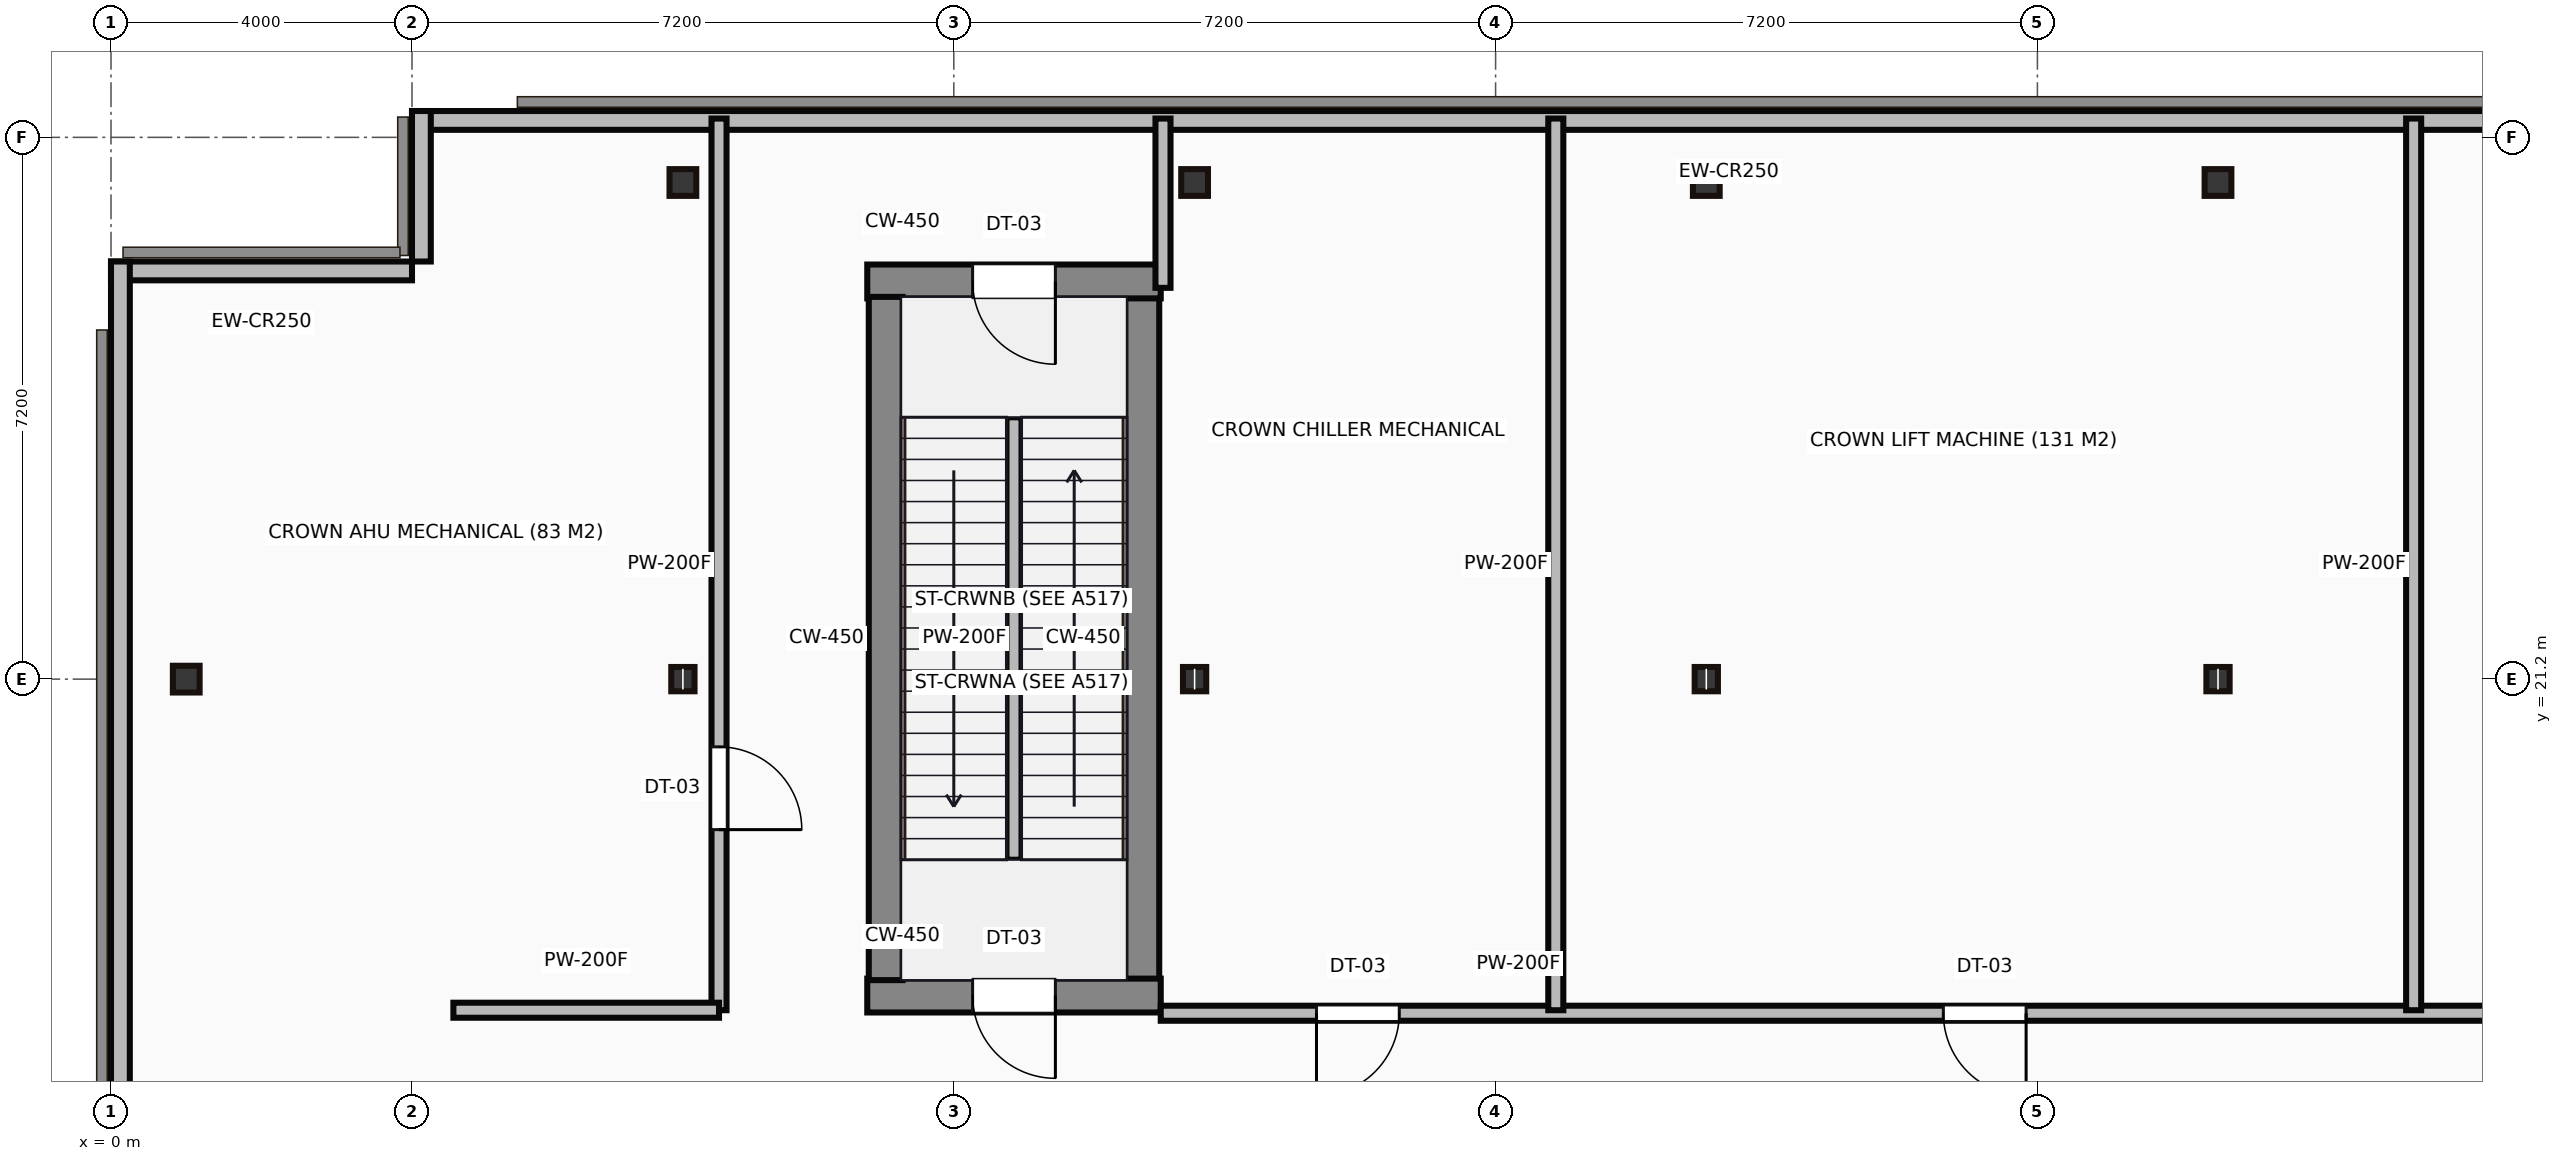
"""IFC4 building model, lengths in metres.
Left out: names, types, materials, properties, quantities, classifications, styles, units other than length and angle.
Written with IfcOpenShell. Run it as: python <this file> out.ifc"""

import sys

from ifc_helpers import new_model, si_unit, direction, frame, frame_2d, origin, origin_2d, place, context, subcontext, project, spatial, rectangle, hollow_rectangle, i_section, extrude, source, transform, mapped, element, fill, save


model = new_model("IFC4")
c1 = context("Model", 3, precision=1e-05, world=origin(), true_north=direction((0.0, 1.0)))
c2 = subcontext(c1, "Body", "Model", "MODEL_VIEW")
j1 = project(units=[si_unit("LENGTHUNIT", "METRE"), si_unit("PLANEANGLEUNIT", "RADIAN")], contexts=[c1])
p1 = place(None, origin())
s1 = spatial("IfcSite", under=j1, at=p1, CompositionType="ELEMENT")
p2 = place(p1, origin())
s2 = spatial("IfcBuilding", under=s1, at=p2, CompositionType="ELEMENT")
p3 = place(p2, frame((0.0, 0.0, 303.65)))
s3 = spatial("IfcBuildingStorey", under=s2, at=p3, CompositionType="ELEMENT", Elevation=303.65)
m1 = source(origin(), c2, "Body", "SweptSolid", [
    extrude(hollow_rectangle(XDim=0.356, YDim=0.356, WallThickness=0.019, at=origin_2d()), origin(), (0.0, 0.0, 1.0), 3.8),
])
p4 = place(p3, frame((1.0, 21.2, 0.0), z_axis=(0.0, 0.0, 1.0), x_axis=(1.0, 0.0, 0.0)))
e1 = element("IfcColumn", 1, at=p4, inside=s3, PredefinedType="COLUMN", context=c2, shape_type="MappedRepresentation", body=[
    mapped(m1, transform((0.0, 0.0, 0.0))),
])
m2 = source(origin(), c2, "Body", "SweptSolid", [
    extrude(i_section(OverallWidth=0.309, OverallDepth=0.323, WebThickness=0.014, FlangeThickness=0.023, at=origin_2d()), origin(), (0.0, 0.0, 1.0), 3.8),
])
p5 = place(p3, frame((7.6, 21.2, 0.0), z_axis=(0.0, 0.0, 1.0), x_axis=(1.0, 0.0, 0.0)))
e2 = element("IfcColumn", 2, at=p5, inside=s3, PredefinedType="COLUMN", context=c2, shape_type="MappedRepresentation", body=[
    mapped(m2, transform((0.0, 0.0, 0.0))),
])
p6 = place(p3, frame((7.6, 27.8, 0.0), z_axis=(0.0, 0.0, 1.0), x_axis=(1.0, 0.0, 0.0)))
e3 = element("IfcColumn", 3, at=p6, inside=s3, PredefinedType="COLUMN", context=c2, shape_type="MappedRepresentation", body=[
    mapped(m1, transform((0.0, 0.0, 0.0))),
])
p7 = place(p3, frame((14.4, 21.2, 0.0), z_axis=(0.0, 0.0, 1.0), x_axis=(1.0, 0.0, 0.0)))
e4 = element("IfcColumn", 4, at=p7, inside=s3, PredefinedType="COLUMN", context=c2, shape_type="MappedRepresentation", body=[
    mapped(m2, transform((0.0, 0.0, 0.0))),
])
p8 = place(p3, frame((14.4, 27.8, 0.0), z_axis=(0.0, 0.0, 1.0), x_axis=(1.0, 0.0, 0.0)))
e5 = element("IfcColumn", 5, at=p8, inside=s3, PredefinedType="COLUMN", context=c2, shape_type="MappedRepresentation", body=[
    mapped(m1, transform((0.0, 0.0, 0.0))),
])
p9 = place(p3, frame((21.2, 21.2, 0.0), z_axis=(0.0, 0.0, 1.0), x_axis=(1.0, 0.0, 0.0)))
e6 = element("IfcColumn", 6, at=p9, inside=s3, PredefinedType="COLUMN", context=c2, shape_type="MappedRepresentation", body=[
    mapped(m2, transform((0.0, 0.0, 0.0))),
])
p10 = place(p3, frame((21.2, 27.8, 0.0), z_axis=(0.0, 0.0, 1.0), x_axis=(1.0, 0.0, 0.0)))
e7 = element("IfcColumn", 7, at=p10, inside=s3, PredefinedType="COLUMN", context=c2, shape_type="MappedRepresentation", body=[
    mapped(m1, transform((0.0, 0.0, 0.0))),
])
p11 = place(p3, frame((28.0, 21.2, 0.0), z_axis=(0.0, 0.0, 1.0), x_axis=(1.0, 0.0, 0.0)))
e8 = element("IfcColumn", 8, at=p11, inside=s3, PredefinedType="COLUMN", context=c2, shape_type="MappedRepresentation", body=[
    mapped(m2, transform((0.0, 0.0, 0.0))),
])
p12 = place(p3, frame((28.0, 27.8, 0.0), z_axis=(0.0, 0.0, 1.0), x_axis=(1.0, 0.0, 0.0)))
e9 = element("IfcColumn", 9, at=p12, inside=s3, PredefinedType="COLUMN", context=c2, shape_type="MappedRepresentation", body=[
    mapped(m1, transform((0.0, 0.0, 0.0))),
])
m3 = source(origin(), c2, "Body", "SweptSolid", [
    extrude(rectangle(XDim=35.0, YDim=0.25, at=frame_2d((17.5, 0.0))), origin(), (0.0, 0.0, 1.0), 3.5),
])
p13 = place(p3, frame((39.0, 28.625, 0.0), z_axis=(0.0, 0.0, 1.0), x_axis=(-1.0, 0.0, 0.0)))
e10 = element("IfcWall", 10, at=p13, inside=s3, PredefinedType="STANDARD", context=c2, shape_type="MappedRepresentation", body=[
    mapped(m3, transform((0.0, 0.0, 0.0))),
])
m4 = source(origin(), c2, "Body", "SweptSolid", [
    extrude(rectangle(XDim=2.0, YDim=0.25, at=frame_2d((1.0, 0.0))), origin(), (0.0, 0.0, 1.0), 3.5),
])
p14 = place(p3, frame((4.125, 28.75, 0.0), z_axis=(0.0, 0.0, 1.0), x_axis=(0.0, -1.0, 0.0)))
e11 = element("IfcWall", 11, at=p14, inside=s3, PredefinedType="STANDARD", context=c2, shape_type="MappedRepresentation", body=[
    mapped(m4, transform((0.0, 0.0, 0.0))),
])
m5 = source(origin(), c2, "Body", "SweptSolid", [
    extrude(rectangle(XDim=4.0, YDim=0.25, at=frame_2d((2.0, 0.0))), origin(), (0.0, 0.0, 1.0), 3.5),
])
p15 = place(p3, frame((4.0, 26.625, 0.0), z_axis=(0.0, 0.0, 1.0), x_axis=(-1.0, 0.0, 0.0)))
e12 = element("IfcWall", 12, at=p15, inside=s3, PredefinedType="STANDARD", context=c2, shape_type="MappedRepresentation", body=[
    mapped(m5, transform((0.0, 0.0, 0.0))),
])
m6 = source(origin(), c2, "Body", "SweptSolid", [
    extrude(rectangle(XDim=22.75, YDim=0.25, at=frame_2d((11.375, 0.0))), origin(), (0.0, 0.0, 1.0), 3.5),
])
p16 = place(p3, frame((0.125, 26.75, 0.0), z_axis=(0.0, 0.0, 1.0), x_axis=(0.0, -1.0, 0.0)))
e13 = element("IfcWall", 13, at=p16, inside=s3, PredefinedType="STANDARD", context=c2, shape_type="MappedRepresentation", body=[
    mapped(m6, transform((0.0, 0.0, 0.0))),
])
m7 = source(origin(), c2, "Body", "SweptSolid", [
    extrude(rectangle(XDim=3.9, YDim=0.45, at=frame_2d((1.95, 0.0))), origin(), (0.0, 0.0, 1.0), 3.8),
])
p17 = place(p3, frame((10.05, 16.995, 0.0), z_axis=(0.0, 0.0, 1.0), x_axis=(1.0, 0.0, 0.0)))
e14 = element("IfcWall", 14, at=p17, inside=s3, PredefinedType="SHEAR", context=c2, shape_type="MappedRepresentation", body=[
    mapped(m7, transform((0.0, 0.0, 0.0))),
])
p18 = place(p17, frame((1.4, 0.0, 0.0)))
e15 = element("IfcOpeningElement", 15, at=p18, cuts=e14, PredefinedType="OPENING", context=c2, shape_type="SweptSolid", body=[
    extrude(rectangle(XDim=1.1, YDim=2.15, at=frame_2d((0.55, 1.075))), frame((0.0, 0.235, 0.0), z_axis=(0.0, -1.0, 0.0), x_axis=(1.0, 0.0, 0.0)), (0.0, 0.0, 1.0), 0.47),
])
m8 = source(origin(), c2, "Body", "SweptSolid", [
    extrude(rectangle(XDim=9.08, YDim=0.45, at=frame_2d((4.54, 0.0))), origin(), (0.0, 0.0, 1.0), 3.8),
])
for number, where, z_axis, x_axis in (
    (16, (10.295, 17.2, 0.0), (0.0, 0.0, 1.0), (0.0, 1.0, 0.0)),
    (17, (13.705, 17.2, 0.0), (0.0, 0.0, 1.0), (0.0, 1.0, 0.0)),
):
    element("IfcWall", number, at=place(p3, frame(where, z_axis=z_axis, x_axis=x_axis)), inside=s3, PredefinedType="SHEAR", context=c2, shape_type="MappedRepresentation", body=[
        mapped(m8, transform((0.0, 0.0, 0.0))),
    ])
p19 = place(p3, frame((10.05, 26.485, 0.0), z_axis=(0.0, 0.0, 1.0), x_axis=(1.0, 0.0, 0.0)))
e18 = element("IfcWall", 18, at=p19, inside=s3, PredefinedType="SHEAR", context=c2, shape_type="MappedRepresentation", body=[
    mapped(m7, transform((0.0, 0.0, 0.0))),
])
p20 = place(p19, frame((1.4, 0.0, 0.0)))
e19 = element("IfcOpeningElement", 19, at=p20, cuts=e18, PredefinedType="OPENING", context=c2, shape_type="SweptSolid", body=[
    extrude(rectangle(XDim=1.1, YDim=2.15, at=frame_2d((0.55, 1.075))), frame((0.0, 0.235, 0.0), z_axis=(0.0, -1.0, 0.0), x_axis=(1.0, 0.0, 0.0)), (0.0, 0.0, 1.0), 0.47),
])
m9 = source(origin(), c2, "Body", "SweptSolid", [
    extrude(rectangle(XDim=5.88, YDim=0.2, at=frame_2d((2.94, 0.0))), origin(), (0.0, 0.0, 1.0), 3.08),
])
p21 = place(p3, frame((12.0, 18.8, 0.0), z_axis=(0.0, 0.0, 1.0), x_axis=(0.0, 1.0, 0.0)))
e20 = element("IfcWall", 20, at=p21, inside=s3, PredefinedType="PARTITIONING", context=c2, shape_type="MappedRepresentation", body=[
    mapped(m9, transform((0.0, 0.0, 0.0))),
])
m10 = source(origin(), c2, "Body", "SweptSolid", [
    extrude(rectangle(XDim=11.85, YDim=0.2, at=frame_2d((5.925, 0.0))), origin(), (0.0, 0.0, 1.0), 3.5),
])
p22 = place(p3, frame((8.08, 16.8, 0.0), z_axis=(0.0, 0.0, 1.0), x_axis=(0.0, 1.0, 0.0)))
e21 = element("IfcWall", 21, at=p22, inside=s3, PredefinedType="PARTITIONING", context=c2, shape_type="MappedRepresentation", body=[
    mapped(m10, transform((0.0, 0.0, 0.0))),
])
p23 = place(p22, frame((2.4, 0.0, 0.0)))
e22 = element("IfcOpeningElement", 22, at=p23, cuts=e21, PredefinedType="OPENING", context=c2, shape_type="SweptSolid", body=[
    extrude(rectangle(XDim=1.1, YDim=2.15, at=frame_2d((0.55, 1.075))), frame((0.0, 0.11, 0.0), z_axis=(0.0, -1.0, 0.0), x_axis=(1.0, 0.0, 0.0)), (0.0, 0.0, 1.0), 0.22),
])
m11 = source(origin(), c2, "Body", "SweptSolid", [
    extrude(rectangle(XDim=3.53, YDim=0.2, at=frame_2d((1.765, 0.0))), origin(), (0.0, 0.0, 1.0), 3.5),
])
p24 = place(p3, frame((4.55, 16.8, 0.0), z_axis=(0.0, 0.0, 1.0), x_axis=(1.0, 0.0, 0.0)))
e23 = element("IfcWall", 23, at=p24, inside=s3, PredefinedType="PARTITIONING", context=c2, shape_type="MappedRepresentation", body=[
    mapped(m11, transform((0.0, 0.0, 0.0))),
])
m12 = source(origin(), c2, "Body", "SweptSolid", [
    extrude(rectangle(XDim=21.6, YDim=0.2, at=frame_2d((10.8, 0.0))), origin(), (0.0, 0.0, 1.0), 3.5),
])
p25 = place(p3, frame((13.95, 16.76, 0.0), z_axis=(0.0, 0.0, 1.0), x_axis=(1.0, 0.0, 0.0)))
e24 = element("IfcWall", 24, at=p25, inside=s3, PredefinedType="PARTITIONING", context=c2, shape_type="MappedRepresentation", body=[
    mapped(m12, transform((0.0, 0.0, 0.0))),
])
p26 = place(p25, frame((2.07, 0.0, 0.0)))
e25 = element("IfcOpeningElement", 25, at=p26, cuts=e24, PredefinedType="OPENING", context=c2, shape_type="SweptSolid", body=[
    extrude(rectangle(XDim=1.1, YDim=2.15, at=frame_2d((0.55, 1.075))), frame((0.0, 0.11, 0.0), z_axis=(0.0, -1.0, 0.0), x_axis=(1.0, 0.0, 0.0)), (0.0, 0.0, 1.0), 0.22),
])
p27 = place(p25, frame((10.4, 0.0, 0.0)))
e26 = element("IfcOpeningElement", 26, at=p27, cuts=e24, PredefinedType="OPENING", context=c2, shape_type="SweptSolid", body=[
    extrude(rectangle(XDim=1.1, YDim=2.15, at=frame_2d((0.55, 1.075))), frame((0.0, 0.11, 0.0), z_axis=(0.0, -1.0, 0.0), x_axis=(1.0, 0.0, 0.0)), (0.0, 0.0, 1.0), 0.22),
])
p28 = place(p25, frame((18.54, 0.0, 0.0)))
e27 = element("IfcOpeningElement", 27, at=p28, cuts=e24, PredefinedType="OPENING", context=c2, shape_type="SweptSolid", body=[
    extrude(rectangle(XDim=1.1, YDim=2.15, at=frame_2d((0.55, 1.075))), frame((0.0, 0.11, 0.0), z_axis=(0.0, -1.0, 0.0), x_axis=(1.0, 0.0, 0.0)), (0.0, 0.0, 1.0), 0.22),
])
m13 = source(origin(), c2, "Body", "SweptSolid", [
    extrude(rectangle(XDim=2.25, YDim=0.2, at=frame_2d((1.125, 0.0))), origin(), (0.0, 0.0, 1.0), 3.5),
])
p29 = place(p3, frame((13.98, 26.4, 0.0), z_axis=(0.0, 0.0, 1.0), x_axis=(0.0, 1.0, 0.0)))
e28 = element("IfcWall", 28, at=p29, inside=s3, PredefinedType="PARTITIONING", context=c2, shape_type="MappedRepresentation", body=[
    mapped(m13, transform((0.0, 0.0, 0.0))),
])
for number, where, z_axis, x_axis in (
    (29, (19.2, 16.8, 0.0), (0.0, 0.0, 1.0), (0.0, 1.0, 0.0)),
    (30, (30.6, 16.8, 0.0), (0.0, 0.0, 1.0), (0.0, 1.0, 0.0)),
):
    element("IfcWall", number, at=place(p3, frame(where, z_axis=z_axis, x_axis=x_axis)), inside=s3, PredefinedType="PARTITIONING", context=c2, shape_type="MappedRepresentation", body=[
        mapped(m10, transform((0.0, 0.0, 0.0))),
    ])
m14 = source(origin(), c2, "Body", "SweptSolid", [
    extrude(rectangle(XDim=1.1, YDim=2.15, at=frame_2d((0.55, 1.075))), frame((0.0, 0.025, 0.0), z_axis=(0.0, -1.0, 0.0), x_axis=(1.0, 0.0, 0.0)), (0.0, 0.0, 1.0), 0.05),
])
p30 = place(p23, frame((1.1, 0.0, 0.0), z_axis=(0.0, 0.0, 1.0), x_axis=(-1.0, 0.0, 0.0)))
e31 = element("IfcDoor", 31, at=p30, inside=s3, OperationType="SINGLE_SWING_LEFT", PredefinedType="DOOR", context=c2, shape_type="MappedRepresentation", body=[
    mapped(m14, transform((0.0, 0.0, 0.0))),
])
fill(e22, e31)
p31 = place(p26, origin())
e32 = element("IfcDoor", 32, at=p31, inside=s3, OperationType="SINGLE_SWING_LEFT", PredefinedType="DOOR", context=c2, shape_type="MappedRepresentation", body=[
    mapped(m14, transform((0.0, 0.0, 0.0))),
])
fill(e25, e32)
p32 = place(p27, origin())
e33 = element("IfcDoor", 33, at=p32, inside=s3, OperationType="SINGLE_SWING_RIGHT", PredefinedType="DOOR", context=c2, shape_type="MappedRepresentation", body=[
    mapped(m14, transform((0.0, 0.0, 0.0))),
])
fill(e26, e33)
p33 = place(p18, origin())
e34 = element("IfcDoor", 34, at=p33, inside=s3, OperationType="SINGLE_SWING_RIGHT", PredefinedType="DOOR", context=c2, shape_type="MappedRepresentation", body=[
    mapped(m14, transform((0.0, 0.0, 0.0))),
])
fill(e15, e34)
p34 = place(p20, frame((1.1, 0.0, 0.0), z_axis=(0.0, 0.0, 1.0), x_axis=(-1.0, 0.0, 0.0)))
e35 = element("IfcDoor", 35, at=p34, inside=s3, OperationType="SINGLE_SWING_RIGHT", PredefinedType="DOOR", context=c2, shape_type="MappedRepresentation", body=[
    mapped(m14, transform((0.0, 0.0, 0.0))),
])
fill(e19, e35)
save(model, sys.argv[1])
